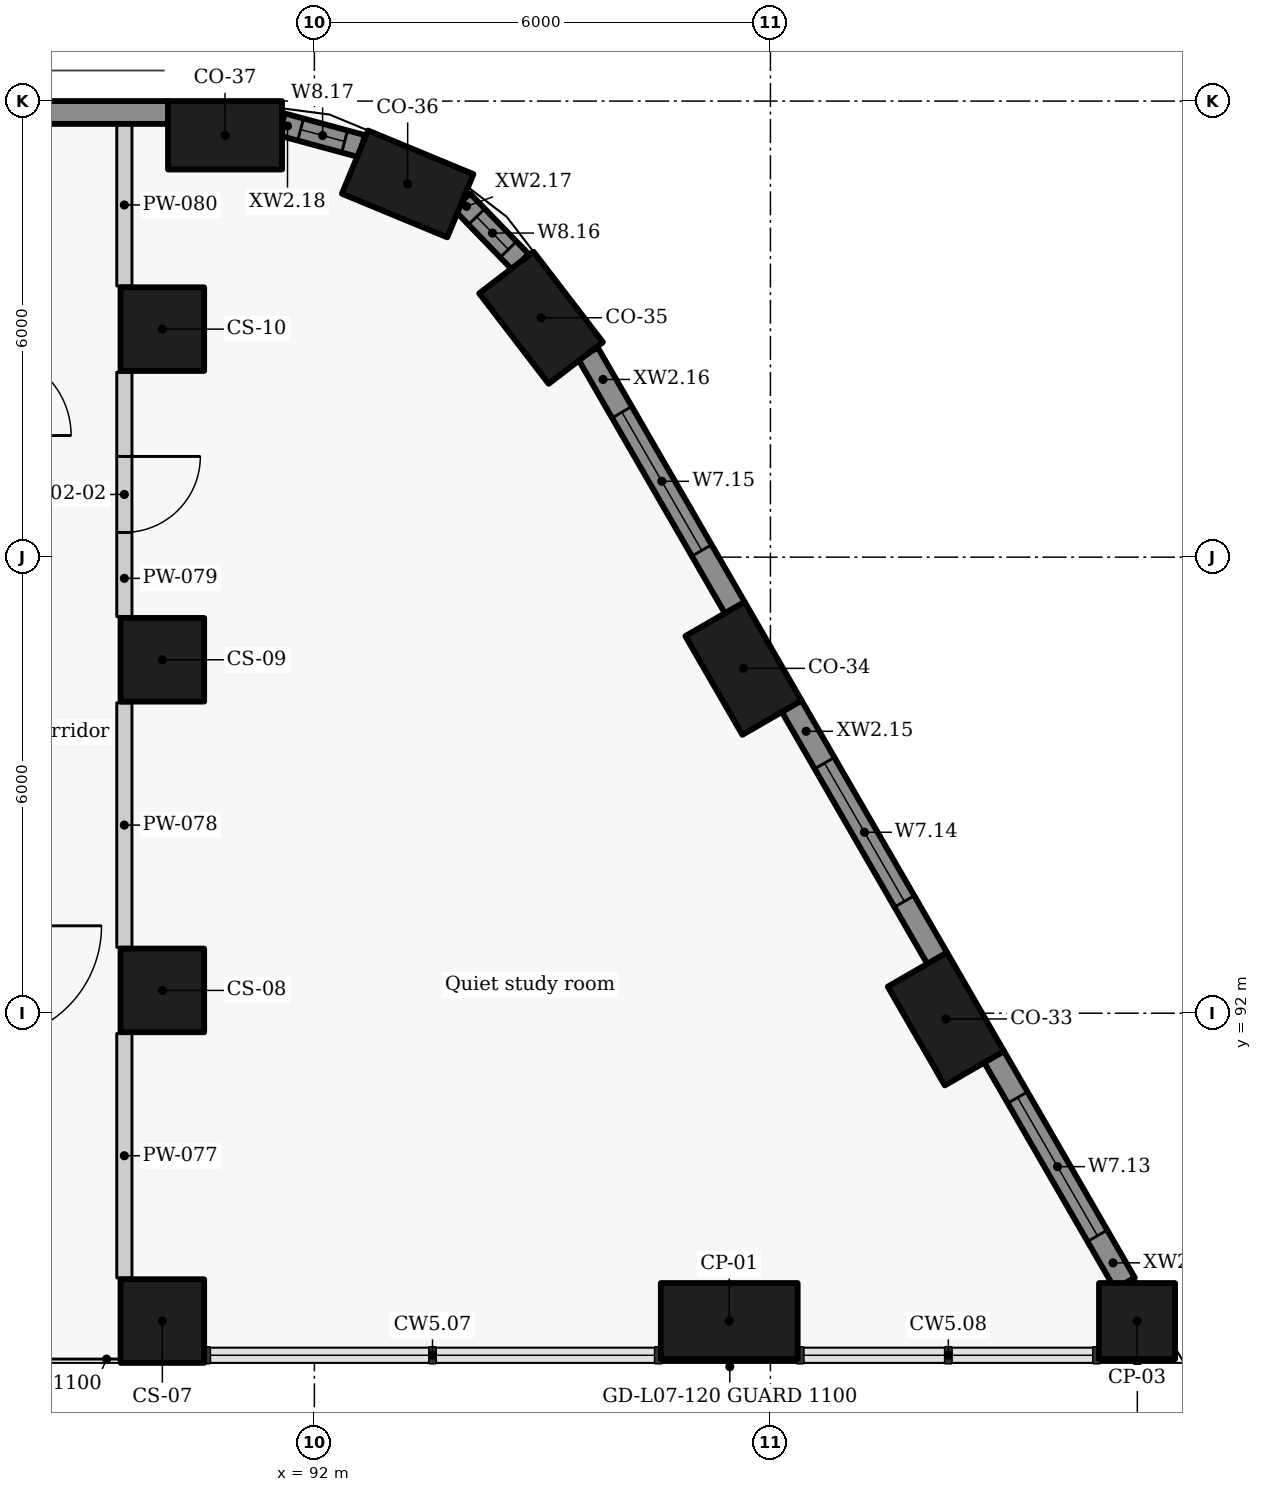
"""IFC4 building model, lengths in metres.
Left out: names, types, materials, properties, quantities, classifications, styles, units other than length and angle.
Written with IfcOpenShell. Run it as: python <this file> out.ifc"""

import sys

from ifc_helpers import new_model, si_unit, direction, frame, frame_2d, origin, origin_2d, place, context, subcontext, project, spatial, rectangle, extrude, element, fill, save


model = new_model("IFC4")
c1 = context("Model", 3, precision=1e-05, world=origin(), true_north=direction((0.0, 1.0)))
c2 = subcontext(c1, "Body", "Model", "MODEL_VIEW")
j1 = project(units=[si_unit("LENGTHUNIT", "METRE"), si_unit("PLANEANGLEUNIT", "RADIAN")], contexts=[c1])
p1 = place(None, origin())
s1 = spatial("IfcSite", under=j1, at=p1, CompositionType="ELEMENT")
p2 = place(p1, origin())
s2 = spatial("IfcBuilding", under=s1, at=p2, CompositionType="ELEMENT")
p3 = place(p2, frame((0.0, 0.0, 31.5)))
s3 = spatial("IfcBuildingStorey", under=s2, at=p3, CompositionType="ELEMENT", Elevation=31.5)
for number, where, z_axis, x_axis in (
    (1, (100.308, 91.925, 0.0), (0.0, 0.0, 1.0), (-0.5, 0.866, 0.0)),
    (2, (97.646, 96.537, 0.0), (0.0, 0.0, 1.0), (-0.5, 0.866, 0.0)),
    (3, (94.982, 101.149, 0.0), (0.0, 0.0, 1.0), (-0.609, 0.793, 0.0)),
    (4, (93.227, 102.91, 0.0), (0.0, 0.0, 1.0), (-0.924, 0.383, 0.0)),
    (5, (90.825, 103.55, 0.0), (0.0, 0.0, 1.0), (-1.0, 0.0, 0.0)),
):
    element("IfcColumn", number, at=place(p3, frame(where, z_axis=z_axis, x_axis=x_axis)), inside=s3, PredefinedType="COLUMN", context=c2, shape_type="SweptSolid", body=[
        extrude(rectangle(XDim=1.5, YDim=0.9, at=origin_2d()), origin(), (0.0, 0.0, 1.0), 3.3),
    ])
for number, where, z_axis, x_axis in (
    (6, (90.0, 87.95, 0.0), (0.0, 0.0, 1.0), (0.0, 1.0, 0.0)),
    (7, (90.0, 92.3, 0.0), (0.0, 0.0, 1.0), (0.0, 1.0, 0.0)),
    (8, (90.0, 96.65, 0.0), (0.0, 0.0, 1.0), (0.0, 1.0, 0.0)),
    (9, (90.0, 101.0, 0.0), (0.0, 0.0, 1.0), (0.0, 1.0, 0.0)),
):
    element("IfcColumn", number, at=place(p3, frame(where, z_axis=z_axis, x_axis=x_axis)), inside=s3, PredefinedType="COLUMN", context=c2, shape_type="SweptSolid", body=[
        extrude(rectangle(XDim=1.1, YDim=1.1, at=origin_2d()), origin(), (0.0, 0.0, 1.0), 3.3),
    ])
p4 = place(p3, frame((97.458, 87.95, 0.0), z_axis=(0.0, 0.0, 1.0), x_axis=(1.0, 0.0, 0.0)))
e10 = element("IfcColumn", 10, at=p4, inside=s3, PredefinedType="COLUMN", context=c2, shape_type="SweptSolid", body=[
    extrude(rectangle(XDim=1.8, YDim=1.0, at=origin_2d()), origin(), (0.0, 0.0, 1.0), 3.3),
])
p5 = place(p3, frame((102.823, 87.95, 0.0), z_axis=(0.0, 0.0, 1.0), x_axis=(1.0, 0.0, 0.0)))
e11 = element("IfcColumn", 11, at=p5, inside=s3, PredefinedType="COLUMN", context=c2, shape_type="SweptSolid", body=[
    extrude(rectangle(XDim=1.0, YDim=1.0, at=origin_2d()), origin(), (0.0, 0.0, 1.0), 3.3),
])
p6 = place(p3, frame((102.663, 88.447, 0.0), z_axis=(0.0, 0.0, 1.0), x_axis=(-0.500035437112, 0.866004943191, 0.0)))
e12 = element("IfcWall", 12, at=p6, inside=s3, PredefinedType="SOLIDWALL", context=c2, shape_type="SweptSolid", body=[
    extrude(rectangle(XDim=3.444, YDim=0.3, at=frame_2d((1.722, 0.0))), origin(), (0.0, 0.0, 1.0), 2.425),
])
p7 = place(p6, frame((0.722, 0.0, 0.9)))
e13 = element("IfcOpeningElement", 13, at=p7, cuts=e12, PredefinedType="OPENING", context=c2, shape_type="SweptSolid", body=[
    extrude(rectangle(XDim=2.1, YDim=1.1, at=frame_2d((1.05, 0.55))), frame((0.0, 0.16, 0.0), z_axis=(0.0, -1.0, 0.0), x_axis=(1.0, 0.0, 0.0)), (0.0, 0.0, 1.0), 0.32),
])
p8 = place(p3, frame((100.195, 92.721, 0.0), z_axis=(0.0, 0.0, 1.0), x_axis=(-0.500001735503, 0.866024401789, 0.0)))
e14 = element("IfcWall", 14, at=p8, inside=s3, PredefinedType="SOLIDWALL", context=c2, shape_type="SweptSolid", body=[
    extrude(rectangle(XDim=3.834, YDim=0.3, at=frame_2d((1.917, 0.0))), origin(), (0.0, 0.0, 1.0), 2.425),
])
p9 = place(p8, frame((0.867, 0.0, 0.9)))
e15 = element("IfcOpeningElement", 15, at=p9, cuts=e14, PredefinedType="OPENING", context=c2, shape_type="SweptSolid", body=[
    extrude(rectangle(XDim=2.1, YDim=1.1, at=frame_2d((1.05, 0.55))), frame((0.0, 0.16, 0.0), z_axis=(0.0, -1.0, 0.0), x_axis=(1.0, 0.0, 0.0)), (0.0, 0.0, 1.0), 0.32),
])
p10 = place(p3, frame((97.532, 97.333, 0.0), z_axis=(0.0, 0.0, 1.0), x_axis=(-0.499948341072, 0.866055227026, 0.0)))
e16 = element("IfcWall", 16, at=p10, inside=s3, PredefinedType="SOLIDWALL", context=c2, shape_type="SweptSolid", body=[
    extrude(rectangle(XDim=3.867, YDim=0.3, at=frame_2d((1.934, 0.0))), origin(), (0.0, 0.0, 1.0), 2.425),
])
p11 = place(p10, frame((0.872, 0.0, 0.9)))
e17 = element("IfcOpeningElement", 17, at=p11, cuts=e16, PredefinedType="OPENING", context=c2, shape_type="SweptSolid", body=[
    extrude(rectangle(XDim=2.1, YDim=1.1, at=frame_2d((1.05, 0.55))), frame((0.0, 0.16, 0.0), z_axis=(0.0, -1.0, 0.0), x_axis=(1.0, 0.0, 0.0)), (0.0, 0.0, 1.0), 0.32),
])
p12 = place(p3, frame((94.713, 101.883, 0.0), z_axis=(0.0, 0.0, 1.0), x_axis=(-0.696138968055, 0.717907053285, 0.0)))
e18 = element("IfcWall", 18, at=p12, inside=s3, PredefinedType="SOLIDWALL", context=c2, shape_type="SweptSolid", body=[
    extrude(rectangle(XDim=1.11, YDim=0.3, at=frame_2d((0.555, 0.0))), origin(), (0.0, 0.0, 1.0), 2.425),
])
p13 = place(p12, frame((0.231, 0.0, 0.9)))
e19 = element("IfcOpeningElement", 19, at=p13, cuts=e18, PredefinedType="OPENING", context=c2, shape_type="SweptSolid", body=[
    extrude(rectangle(XDim=0.6, YDim=1.1, at=frame_2d((0.3, 0.55))), frame((0.0, 0.16, 0.0), z_axis=(0.0, -1.0, 0.0), x_axis=(1.0, 0.0, 0.0)), (0.0, 0.0, 1.0), 0.32),
])
p14 = place(p3, frame((92.625, 103.407, 0.0), z_axis=(0.0, 0.0, 1.0), x_axis=(-0.96522637192, 0.261415475728, 0.0)))
e20 = element("IfcWall", 20, at=p14, inside=s3, PredefinedType="SOLIDWALL", context=c2, shape_type="SweptSolid", body=[
    extrude(rectangle(XDim=1.093, YDim=0.3, at=frame_2d((0.546, 0.0))), origin(), (0.0, 0.0, 1.0), 2.425),
])
p15 = place(p14, frame((0.236, 0.0, 0.9)))
e21 = element("IfcOpeningElement", 21, at=p15, cuts=e20, PredefinedType="OPENING", context=c2, shape_type="SweptSolid", body=[
    extrude(rectangle(XDim=0.6, YDim=1.1, at=frame_2d((0.3, 0.55))), frame((0.0, 0.16, 0.0), z_axis=(0.0, -1.0, 0.0), x_axis=(1.0, 0.0, 0.0)), (0.0, 0.0, 1.0), 0.32),
])
p16 = place(p3, frame((90.079, 103.85, 0.0), z_axis=(0.0, 0.0, 1.0), x_axis=(-1.0, 0.0, 0.0)))
e22 = element("IfcWall", 22, at=p16, inside=s3, PredefinedType="SOLIDWALL", context=c2, shape_type="SweptSolid", body=[
    extrude(rectangle(XDim=20.19, YDim=0.3, at=frame_2d((10.095, 0.0))), origin(), (0.0, 0.0, 1.0), 2.425),
])
p17 = place(p3, frame((89.5, 88.517, 0.0), z_axis=(0.0, 0.0, 1.0), x_axis=(0.0, 1.0, 0.0)))
e23 = element("IfcWall", 23, at=p17, inside=s3, PredefinedType="PARTITIONING", context=c2, shape_type="SweptSolid", body=[
    extrude(rectangle(XDim=3.216, YDim=0.2, at=frame_2d((1.608, 0.0))), origin(), (0.0, 0.0, 1.0), 3.025),
])
p18 = place(p3, frame((89.5, 92.867, 0.0), z_axis=(0.0, 0.0, 1.0), x_axis=(0.0, 1.0, 0.0)))
e24 = element("IfcWall", 24, at=p18, inside=s3, PredefinedType="PARTITIONING", context=c2, shape_type="SweptSolid", body=[
    extrude(rectangle(XDim=3.216, YDim=0.2, at=frame_2d((1.608, 0.0))), origin(), (0.0, 0.0, 1.0), 3.025),
])
p19 = place(p3, frame((89.5, 100.433, 0.0), z_axis=(0.0, 0.0, 1.0), x_axis=(0.0, -1.0, 0.0)))
e25 = element("IfcWall", 25, at=p19, inside=s3, PredefinedType="PARTITIONING", context=c2, shape_type="SweptSolid", body=[
    extrude(rectangle(XDim=3.216, YDim=0.2, at=frame_2d((1.608, 0.0))), origin(), (0.0, 0.0, 1.0), 3.025),
])
p20 = place(p19, frame((1.108, 0.0, 0.0)))
e26 = element("IfcOpeningElement", 26, at=p20, cuts=e25, PredefinedType="OPENING", context=c2, shape_type="SweptSolid", body=[
    extrude(rectangle(XDim=1.0, YDim=2.1, at=frame_2d((0.5, 1.05))), frame((0.0, 0.11, 0.0), z_axis=(0.0, -1.0, 0.0), x_axis=(1.0, 0.0, 0.0)), (0.0, 0.0, 1.0), 0.22),
])
p21 = place(p3, frame((89.5, 101.567, 0.0), z_axis=(0.0, 0.0, 1.0), x_axis=(0.0, 1.0, 0.0)))
e27 = element("IfcWall", 27, at=p21, inside=s3, PredefinedType="PARTITIONING", context=c2, shape_type="SweptSolid", body=[
    extrude(rectangle(XDim=2.133, YDim=0.2, at=frame_2d((1.066, 0.0))), origin(), (0.0, 0.0, 1.0), 3.025),
])
p22 = place(p7, origin())
e28 = element("IfcWindow", 28, at=p22, inside=s3, PartitioningType="SINGLE_PANEL", PredefinedType="WINDOW", context=c2, shape_type="SweptSolid", body=[
    extrude(rectangle(XDim=2.1, YDim=1.1, at=frame_2d((1.05, 0.55))), frame((0.0, 0.03, 0.0), z_axis=(0.0, -1.0, 0.0), x_axis=(1.0, 0.0, 0.0)), (0.0, 0.0, 1.0), 0.06),
])
fill(e13, e28)
p23 = place(p9, origin())
e29 = element("IfcWindow", 29, at=p23, inside=s3, PartitioningType="SINGLE_PANEL", PredefinedType="WINDOW", context=c2, shape_type="SweptSolid", body=[
    extrude(rectangle(XDim=2.1, YDim=1.1, at=frame_2d((1.05, 0.55))), frame((0.0, 0.03, 0.0), z_axis=(0.0, -1.0, 0.0), x_axis=(1.0, 0.0, 0.0)), (0.0, 0.0, 1.0), 0.06),
])
fill(e15, e29)
p24 = place(p11, origin())
e30 = element("IfcWindow", 30, at=p24, inside=s3, PartitioningType="SINGLE_PANEL", PredefinedType="WINDOW", context=c2, shape_type="SweptSolid", body=[
    extrude(rectangle(XDim=2.1, YDim=1.1, at=frame_2d((1.05, 0.55))), frame((0.0, 0.03, 0.0), z_axis=(0.0, -1.0, 0.0), x_axis=(1.0, 0.0, 0.0)), (0.0, 0.0, 1.0), 0.06),
])
fill(e17, e30)
p25 = place(p13, origin())
e31 = element("IfcWindow", 31, at=p25, inside=s3, PartitioningType="SINGLE_PANEL", PredefinedType="WINDOW", context=c2, shape_type="SweptSolid", body=[
    extrude(rectangle(XDim=0.6, YDim=1.1, at=frame_2d((0.3, 0.55))), frame((0.0, 0.03, 0.0), z_axis=(0.0, -1.0, 0.0), x_axis=(1.0, 0.0, 0.0)), (0.0, 0.0, 1.0), 0.06),
])
fill(e19, e31)
p26 = place(p15, origin())
e32 = element("IfcWindow", 32, at=p26, inside=s3, PartitioningType="SINGLE_PANEL", PredefinedType="WINDOW", context=c2, shape_type="SweptSolid", body=[
    extrude(rectangle(XDim=0.6, YDim=1.1, at=frame_2d((0.3, 0.55))), frame((0.0, 0.03, 0.0), z_axis=(0.0, -1.0, 0.0), x_axis=(1.0, 0.0, 0.0)), (0.0, 0.0, 1.0), 0.06),
])
fill(e21, e32)
p27 = place(p20, origin())
e33 = element("IfcDoor", 33, at=p27, inside=s3, OperationType="SINGLE_SWING_LEFT", PredefinedType="DOOR", context=c2, shape_type="SweptSolid", body=[
    extrude(rectangle(XDim=1.0, YDim=2.1, at=frame_2d((0.5, 1.05))), frame((0.0, 0.025, 0.0), z_axis=(0.0, -1.0, 0.0), x_axis=(1.0, 0.0, 0.0)), (0.0, 0.0, 1.0), 0.05),
])
fill(e26, e33)
save(model, sys.argv[1])
